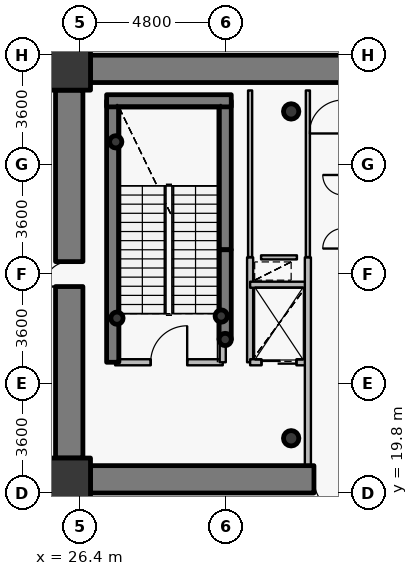
"""IFC4 building model, lengths in metres.
Left out: names, types, materials, properties, quantities, classifications, styles, units other than length and angle.
Written with IfcOpenShell. Run it as: python <this file> out.ifc"""

import sys

from ifc_helpers import new_model, si_unit, direction, frame, frame_2d, origin, origin_2d, place, context, subcontext, project, spatial, rectangle, hollow_circle, extrude, source, transform, mapped, element, fill, save


model = new_model("IFC4")
c1 = context("Model", 3, precision=1e-05, world=origin(), true_north=direction((0.0, 1.0)))
c2 = subcontext(c1, "Body", "Model", "MODEL_VIEW")
j1 = project(units=[si_unit("LENGTHUNIT", "METRE"), si_unit("PLANEANGLEUNIT", "RADIAN")], contexts=[c1])
p1 = place(None, origin())
s1 = spatial("IfcSite", under=j1, at=p1, CompositionType="ELEMENT")
p2 = place(p1, origin())
s2 = spatial("IfcBuilding", under=s1, at=p2, CompositionType="ELEMENT")
p3 = place(p2, frame((0.0, 0.0, -4.5)))
s3 = spatial("IfcBuildingStorey", under=s2, at=p3, CompositionType="ELEMENT", Elevation=-4.5)
for number, where, z_axis, x_axis in (
    (1, (26.05, 20.25, 0.0), (0.0, 0.0, 1.0), (1.0, 0.0, 0.0)),
    (2, (26.05, 33.75, 0.0), (0.0, 0.0, 1.0), (1.0, 0.0, 0.0)),
):
    element("IfcColumn", number, at=place(p3, frame(where, z_axis=z_axis, x_axis=x_axis)), inside=s3, PredefinedType="COLUMN", context=c2, shape_type="SweptSolid", body=[
        extrude(rectangle(XDim=1.4, YDim=1.4, at=origin_2d()), origin(), (0.0, 0.0, 1.0), 4.5),
    ])
for number, where, z_axis, x_axis in (
    (3, (33.35, 21.6, 0.0), (0.0, 0.0, 1.0), (1.0, 0.0, 0.0)),
    (4, (33.35, 32.35, 0.0), (0.0, 0.0, 1.0), (1.0, 0.0, 0.0)),
):
    element("IfcColumn", number, at=place(p3, frame(where, z_axis=z_axis, x_axis=x_axis)), inside=s3, PredefinedType="COLUMN", context=c2, shape_type="SweptSolid", body=[
        extrude(hollow_circle(Radius=0.254, WallThickness=0.02, at=origin_2d()), origin(), (0.0, 0.0, 1.0), 4.5),
    ])
p4 = place(p3, frame((27.48, 24.1, 0.0), z_axis=(0.0, 0.0, 1.0), x_axis=(0.0, 1.0, 0.0)))
e5 = element("IfcWall", 5, at=p4, inside=s3, PredefinedType="SHEAR", context=c2, shape_type="SweptSolid", body=[
    extrude(rectangle(XDim=8.6, YDim=0.4, at=frame_2d((4.3, 0.0))), origin(), (0.0, 0.0, 1.0), 4.5),
])
p5 = place(p3, frame((31.18, 27.8, 0.0), z_axis=(0.0, 0.0, 1.0), x_axis=(0.0, 1.0, 0.0)))
e6 = element("IfcWall", 6, at=p5, inside=s3, PredefinedType="SHEAR", context=c2, shape_type="SweptSolid", body=[
    extrude(rectangle(XDim=4.9, YDim=0.4, at=frame_2d((2.45, 0.0))), origin(), (0.0, 0.0, 1.0), 4.5),
])
p6 = place(p3, frame((27.28, 32.7, 0.0), z_axis=(0.0, 0.0, 1.0), x_axis=(1.0, 0.0, 0.0)))
e7 = element("IfcWall", 7, at=p6, inside=s3, PredefinedType="SHEAR", context=c2, shape_type="SweptSolid", body=[
    extrude(rectangle(XDim=4.1, YDim=0.4, at=frame_2d((2.05, 0.0))), origin(), (0.0, 0.0, 1.0), 4.5),
])
for number, where, z_axis, x_axis in (
    (8, (27.58, 31.35, 0.0), (0.0, 0.0, 1.0), (1.0, 0.0, 0.0)),
    (9, (31.05, 25.62, 0.0), (0.0, 0.0, 1.0), (1.0, 0.0, 0.0)),
    (10, (31.18, 24.85, 0.0), (0.0, 0.0, 1.0), (1.0, 0.0, 0.0)),
    (11, (27.62, 25.55, 0.0), (0.0, 0.0, 1.0), (1.0, 0.0, 0.0)),
):
    element("IfcColumn", number, at=place(p3, frame(where, z_axis=z_axis, x_axis=x_axis)), inside=s3, PredefinedType="COLUMN", context=c2, shape_type="SweptSolid", body=[
        extrude(hollow_circle(Radius=0.203, WallThickness=0.016, at=origin_2d()), origin(), (0.0, 0.0, 1.0), 4.5),
    ])
p7 = place(p3, frame((26.75, 33.75, 0.0), z_axis=(0.0, 0.0, 1.0), x_axis=(1.0, 0.0, 0.0)))
e12 = element("IfcWall", 12, at=p7, inside=s3, PredefinedType="SHEAR", context=c2, shape_type="SweptSolid", body=[
    extrude(rectangle(XDim=18.5, YDim=0.9, at=frame_2d((9.25, 0.0))), origin(), (0.0, 0.0, 1.0), 3.65),
])
p8 = place(p3, frame((45.25, 20.25, 0.0), z_axis=(0.0, 0.0, 1.0), x_axis=(-1.0, 0.0, 0.0)))
e13 = element("IfcWall", 13, at=p8, inside=s3, PredefinedType="SHEAR", context=c2, shape_type="SweptSolid", body=[
    extrude(rectangle(XDim=18.5, YDim=0.9, at=frame_2d((9.25, 0.0))), origin(), (0.0, 0.0, 1.0), 3.65),
])
p9 = place(p8, frame((10.0, 0.0, 0.0)))
e14 = element("IfcOpeningElement", 14, at=p9, cuts=e13, PredefinedType="OPENING", context=c2, shape_type="SweptSolid", body=[
    extrude(rectangle(XDim=1.15, YDim=2.15, at=origin_2d()), frame((0.575, 0.46, 1.075), z_axis=(0.0, -1.0, 0.0), x_axis=(1.0, 0.0, 0.0)), (0.0, 0.0, 1.0), 0.92),
])
p10 = place(p3, frame((26.05, 20.95, 0.0), z_axis=(0.0, 0.0, 1.0), x_axis=(0.0, 1.0, 0.0)))
e15 = element("IfcWall", 15, at=p10, inside=s3, PredefinedType="SHEAR", context=c2, shape_type="SweptSolid", body=[
    extrude(rectangle(XDim=12.1, YDim=0.9, at=frame_2d((6.05, 0.0))), origin(), (0.0, 0.0, 1.0), 3.65),
])
p11 = place(p10, frame((5.64, 0.0, 0.0)))
e16 = element("IfcOpeningElement", 16, at=p11, cuts=e15, PredefinedType="OPENING", context=c2, shape_type="SweptSolid", body=[
    extrude(rectangle(XDim=0.82, YDim=2.1, at=origin_2d()), frame((0.41, 0.46, 1.05), z_axis=(0.0, -1.0, 0.0), x_axis=(1.0, 0.0, 0.0)), (0.0, 0.0, 1.0), 0.92),
])
p12 = place(p3, frame((31.18, 24.85, 0.0), z_axis=(0.0, 0.0, 1.0), x_axis=(0.0, 1.0, 0.0)))
e17 = element("IfcWall", 17, at=p12, inside=s3, PredefinedType="SHEAR", context=c2, shape_type="SweptSolid", body=[
    extrude(rectangle(XDim=2.95, YDim=0.4, at=frame_2d((1.475, 0.0))), origin(), (0.0, 0.0, 1.0), 3.8),
])
p13 = place(p3, frame((27.56, 24.1, 0.0), z_axis=(0.0, 0.0, 1.0), x_axis=(1.0, 0.0, 0.0)))
e18 = element("IfcWall", 18, at=p13, inside=s3, PredefinedType="PARTITIONING", context=c2, shape_type="SweptSolid", body=[
    extrude(rectangle(XDim=3.54, YDim=0.2, at=frame_2d((1.77, 0.0))), origin(), (0.0, 0.0, 1.0), 4.2),
])
p14 = place(p13, frame((1.17, 0.0, 0.0)))
e19 = element("IfcOpeningElement", 19, at=p14, cuts=e18, PredefinedType="OPENING", context=c2, shape_type="SweptSolid", body=[
    extrude(rectangle(XDim=1.2, YDim=2.15, at=origin_2d()), frame((0.6, 0.11, 1.075), z_axis=(0.0, -1.0, 0.0), x_axis=(1.0, 0.0, 0.0)), (0.0, 0.0, 1.0), 0.22),
])
p15 = place(p3, frame((31.1, 24.1, 0.0), z_axis=(0.0, 0.0, 1.0), x_axis=(0.0, 1.0, 0.0)))
e20 = element("IfcWall", 20, at=p15, inside=s3, PredefinedType="PARTITIONING", context=c2, shape_type="SweptSolid", body=[
    extrude(rectangle(XDim=0.74, YDim=0.2, at=frame_2d((0.37, 0.0))), origin(), (0.0, 0.0, 1.0), 4.2),
])
p16 = place(p3, frame((32.0, 24.1, 0.0), z_axis=(0.0, 0.0, 1.0), x_axis=(0.0, 1.0, 0.0)))
e21 = element("IfcWall", 21, at=p16, inside=s3, PredefinedType="PARTITIONING", context=c2, shape_type="SweptSolid", body=[
    extrude(rectangle(XDim=3.45, YDim=0.2, at=frame_2d((1.725, 0.0))), origin(), (0.0, 0.0, 1.0), 4.2),
])
p17 = place(p3, frame((32.0, 24.1, 0.0), z_axis=(0.0, 0.0, 1.0), x_axis=(1.0, 0.0, 0.0)))
e22 = element("IfcWall", 22, at=p17, inside=s3, PredefinedType="PARTITIONING", context=c2, shape_type="SweptSolid", body=[
    extrude(rectangle(XDim=1.9, YDim=0.2, at=frame_2d((0.95, 0.0))), origin(), (0.0, 0.0, 1.0), 3.785),
])
p18 = place(p17, frame((0.375, 0.0, 0.0)))
e23 = element("IfcOpeningElement", 23, at=p18, cuts=e22, PredefinedType="OPENING", context=c2, shape_type="SweptSolid", body=[
    extrude(rectangle(XDim=1.15, YDim=2.15, at=origin_2d()), frame((0.575, 0.11, 1.075), z_axis=(0.0, -1.0, 0.0), x_axis=(1.0, 0.0, 0.0)), (0.0, 0.0, 1.0), 0.22),
])
p19 = place(p3, frame((32.0, 26.65, 0.0), z_axis=(0.0, 0.0, 1.0), x_axis=(1.0, 0.0, 0.0)))
e24 = element("IfcWall", 24, at=p19, inside=s3, PredefinedType="PARTITIONING", context=c2, shape_type="SweptSolid", body=[
    extrude(rectangle(XDim=1.9, YDim=0.2, at=frame_2d((0.95, 0.0))), origin(), (0.0, 0.0, 1.0), 3.785),
])
p20 = place(p3, frame((33.9, 20.7, 0.0), z_axis=(0.0, 0.0, 1.0), x_axis=(0.0, 1.0, 0.0)))
e25 = element("IfcWall", 25, at=p20, inside=s3, PredefinedType="PARTITIONING", context=c2, shape_type="SweptSolid", body=[
    extrude(rectangle(XDim=6.85, YDim=0.2, at=frame_2d((3.425, 0.0))), origin(), (0.0, 0.0, 1.0), 3.785),
])
p21 = place(p3, frame((32.36, 27.55, 0.0), z_axis=(0.0, 0.0, 1.0), x_axis=(1.0, 0.0, 0.0)))
e26 = element("IfcWall", 26, at=p21, inside=s3, PredefinedType="PARTITIONING", context=c2, shape_type="SweptSolid", body=[
    extrude(rectangle(XDim=1.18, YDim=0.135, at=frame_2d((0.59, 0.0))), origin(), (0.0, 0.0, 1.0), 3.785),
])
p22 = place(p3, frame((32.0, 33.04, 0.0), z_axis=(0.0, 0.0, 1.0), x_axis=(0.0, -1.0, 0.0)))
e27 = element("IfcWall", 27, at=p22, inside=s3, PredefinedType="PARTITIONING", context=c2, shape_type="SweptSolid", body=[
    extrude(rectangle(XDim=5.48, YDim=0.135, at=frame_2d((2.74, 0.0))), origin(), (0.0, 0.0, 1.0), 3.735),
])
p23 = place(p3, frame((33.9, 27.56, 0.0), z_axis=(0.0, 0.0, 1.0), x_axis=(0.0, 1.0, 0.0)))
e28 = element("IfcWall", 28, at=p23, inside=s3, PredefinedType="PARTITIONING", context=c2, shape_type="SweptSolid", body=[
    extrude(rectangle(XDim=5.48, YDim=0.135, at=frame_2d((2.74, 0.0))), origin(), (0.0, 0.0, 1.0), 3.785),
])
m1 = source(origin(), c2, "Body", "SweptSolid", [
    extrude(rectangle(XDim=0.82, YDim=2.1, at=origin_2d()), frame((0.41, 0.025, 1.05), z_axis=(0.0, -1.0, 0.0), x_axis=(1.0, 0.0, 0.0)), (0.0, 0.0, 1.0), 0.05),
])
p24 = place(p11, origin())
e29 = element("IfcDoor", 29, at=p24, inside=s3, OperationType="SINGLE_SWING_LEFT", PredefinedType="DOOR", context=c2, shape_type="MappedRepresentation", body=[
    mapped(m1, transform((0.0, 0.0, 0.0), x_axis=(1.0, 0.0, 0.0), y_axis=(0.0, 1.0, 0.0), z_axis=(0.0, 0.0, 1.0), scale=1.0)),
])
fill(e16, e29)
m2 = source(origin(), c2, "Body", "SweptSolid", [
    extrude(rectangle(XDim=1.15, YDim=2.15, at=origin_2d()), frame((0.575, 0.025, 1.075), z_axis=(0.0, -1.0, 0.0), x_axis=(1.0, 0.0, 0.0)), (0.0, 0.0, 1.0), 0.05),
])
p25 = place(p9, origin())
e30 = element("IfcDoor", 30, at=p25, inside=s3, OperationType="SINGLE_SWING_LEFT", PredefinedType="DOOR", context=c2, shape_type="MappedRepresentation", body=[
    mapped(m2, transform((0.0, 0.0, 0.0), x_axis=(1.0, 0.0, 0.0), y_axis=(0.0, 1.0, 0.0), z_axis=(0.0, 0.0, 1.0), scale=1.0)),
])
fill(e14, e30)
m3 = source(origin(), c2, "Body", "SweptSolid", [
    extrude(rectangle(XDim=1.2, YDim=2.15, at=origin_2d()), frame((0.6, 0.025, 1.075), z_axis=(0.0, -1.0, 0.0), x_axis=(1.0, 0.0, 0.0)), (0.0, 0.0, 1.0), 0.05),
])
p26 = place(p14, origin())
e31 = element("IfcDoor", 31, at=p26, inside=s3, OperationType="SINGLE_SWING_RIGHT", PredefinedType="DOOR", context=c2, shape_type="MappedRepresentation", body=[
    mapped(m3, transform((0.0, 0.0, 0.0), x_axis=(1.0, 0.0, 0.0), y_axis=(0.0, 1.0, 0.0), z_axis=(0.0, 0.0, 1.0), scale=1.0)),
])
fill(e19, e31)
m4 = source(origin(), c2, "Body", "SweptSolid", [
    extrude(rectangle(XDim=1.15, YDim=2.15, at=origin_2d()), frame((0.575, 0.025, 1.075), z_axis=(0.0, -1.0, 0.0), x_axis=(1.0, 0.0, 0.0)), (0.0, 0.0, 1.0), 0.05),
])
p27 = place(p18, origin())
e32 = element("IfcDoor", 32, at=p27, inside=s3, OperationType="DOUBLE_DOOR_SLIDING", PredefinedType="USERDEFINED", context=c2, shape_type="MappedRepresentation", body=[
    mapped(m4, transform((0.0, 0.0, 0.0), x_axis=(1.0, 0.0, 0.0), y_axis=(0.0, 1.0, 0.0), z_axis=(0.0, 0.0, 1.0), scale=1.0)),
])
fill(e23, e32)
save(model, sys.argv[1])
